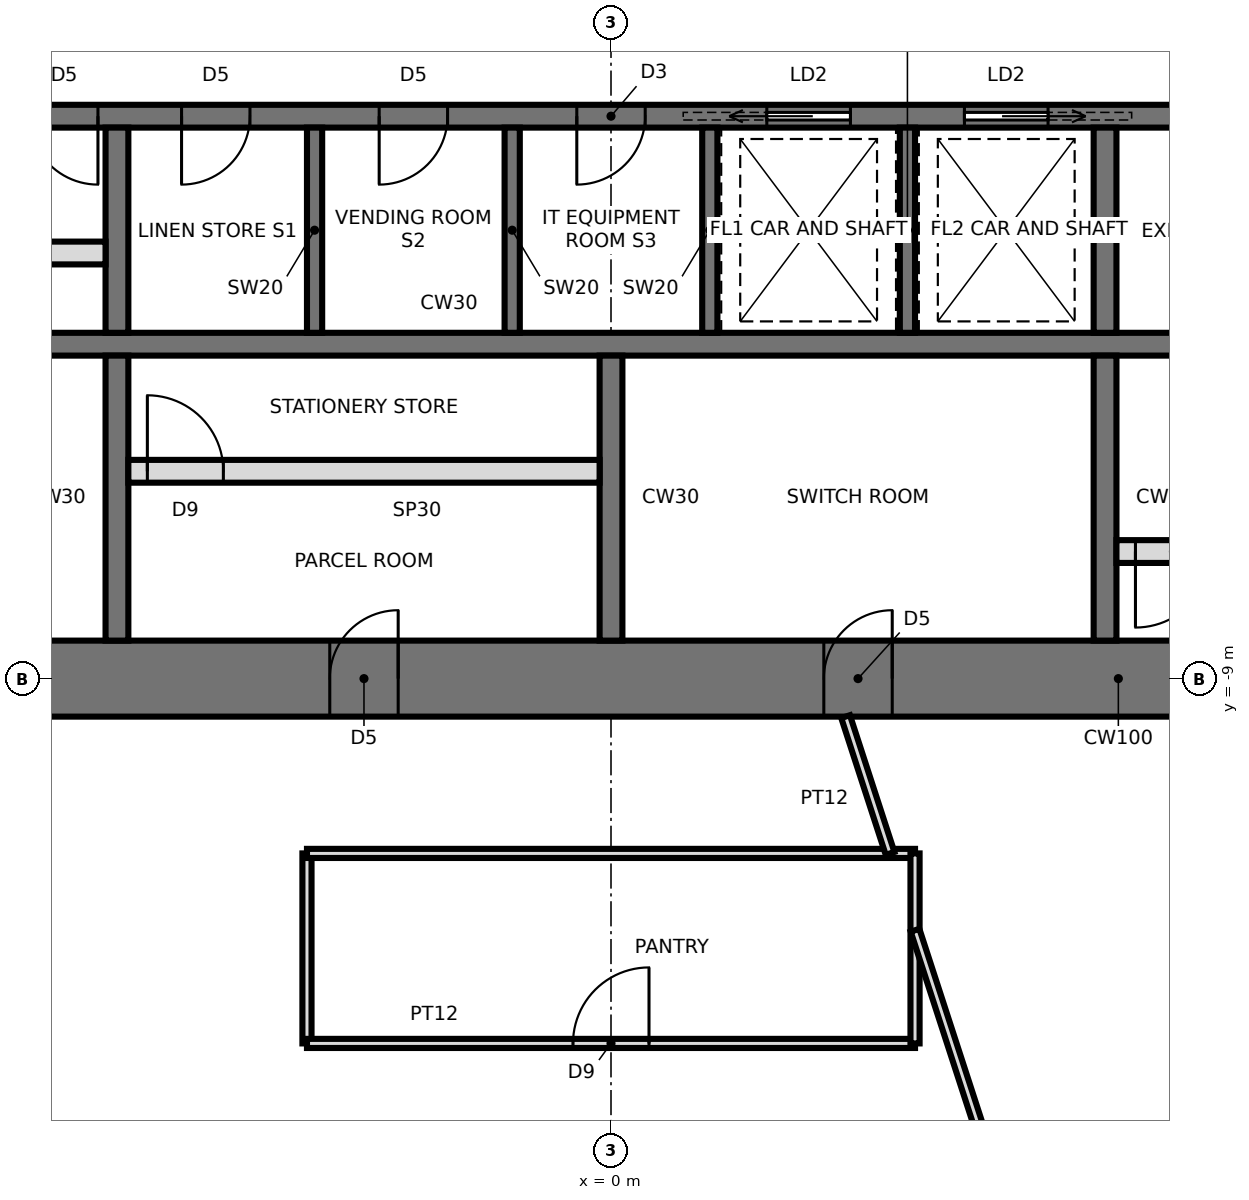
"""IFC4 building model, lengths in metres.
Left out: names, types, materials, properties, quantities, classifications, styles, units other than length and angle.
Written with IfcOpenShell. Run it as: python <this file> out.ifc"""

import sys

from ifc_helpers import new_model, si_unit, direction, frame, frame_2d, origin, place, context, subcontext, project, spatial, rectangle, extrude, element, fill, save


model = new_model("IFC4")
c1 = context("Model", 3, precision=1e-05, world=origin(), true_north=direction((0.0, 1.0)))
c2 = subcontext(c1, "Body", "Model", "MODEL_VIEW")
j1 = project(units=[si_unit("LENGTHUNIT", "METRE"), si_unit("PLANEANGLEUNIT", "RADIAN")], contexts=[c1])
p1 = place(None, origin())
s1 = spatial("IfcSite", under=j1, at=p1, CompositionType="ELEMENT")
p2 = place(p1, origin())
s2 = spatial("IfcBuilding", under=s1, at=p2, CompositionType="ELEMENT")
p3 = place(p2, frame((0.0, 0.0, 256.0)))
s3 = spatial("IfcBuildingStorey", under=s2, at=p3, CompositionType="ELEMENT", Elevation=256.0)
p4 = place(p3, frame((-13.2, -9.0, 0.0), z_axis=(0.0, 0.0, 1.0), x_axis=(1.0, 0.0, 0.0)))
e1 = element("IfcWall", 1, at=p4, inside=s3, PredefinedType="SHEAR", context=c2, shape_type="SweptSolid", body=[
    extrude(rectangle(XDim=26.4, YDim=1.0, at=frame_2d((13.2, 0.0))), origin(), (0.0, 0.0, 1.0), 4.2),
])
p5 = place(p4, frame((2.65, 0.0, 0.0)))
e2 = element("IfcOpeningElement", 2, at=p5, cuts=e1, PredefinedType="OPENING", context=c2, shape_type="SweptSolid", body=[
    extrude(rectangle(XDim=0.9, YDim=2.1, at=frame_2d((0.45, 1.05))), frame((0.0, 0.51, 0.0), z_axis=(0.0, -1.0, 0.0), x_axis=(1.0, 0.0, 0.0)), (0.0, 0.0, 1.0), 1.02),
])
p6 = place(p4, frame((9.5, 0.0, 0.0)))
e3 = element("IfcOpeningElement", 3, at=p6, cuts=e1, PredefinedType="OPENING", context=c2, shape_type="SweptSolid", body=[
    extrude(rectangle(XDim=0.9, YDim=2.1, at=frame_2d((0.45, 1.05))), frame((0.0, 0.51, 0.0), z_axis=(0.0, -1.0, 0.0), x_axis=(1.0, 0.0, 0.0)), (0.0, 0.0, 1.0), 1.02),
])
p7 = place(p4, frame((16.0, 0.0, 0.0)))
e4 = element("IfcOpeningElement", 4, at=p7, cuts=e1, PredefinedType="OPENING", context=c2, shape_type="SweptSolid", body=[
    extrude(rectangle(XDim=0.9, YDim=2.1, at=frame_2d((0.45, 1.05))), frame((0.0, 0.51, 0.0), z_axis=(0.0, -1.0, 0.0), x_axis=(1.0, 0.0, 0.0)), (0.0, 0.0, 1.0), 1.02),
])
p8 = place(p4, frame((22.85, 0.0, 0.0)))
e5 = element("IfcOpeningElement", 5, at=p8, cuts=e1, PredefinedType="OPENING", context=c2, shape_type="SweptSolid", body=[
    extrude(rectangle(XDim=0.9, YDim=2.1, at=frame_2d((0.45, 1.05))), frame((0.0, 0.51, 0.0), z_axis=(0.0, -1.0, 0.0), x_axis=(1.0, 0.0, 0.0)), (0.0, 0.0, 1.0), 1.02),
])
p9 = place(p3, frame((-13.2, -1.6, 0.0), z_axis=(0.0, 0.0, 1.0), x_axis=(1.0, 0.0, 0.0)))
e6 = element("IfcWall", 6, at=p9, inside=s3, PredefinedType="SHEAR", context=c2, shape_type="SweptSolid", body=[
    extrude(rectangle(XDim=26.4, YDim=0.3, at=frame_2d((13.2, 0.0))), origin(), (0.0, 0.0, 1.0), 4.2),
])
p10 = place(p9, frame((25.15, 0.0, 0.0)))
e7 = element("IfcOpeningElement", 7, at=p10, cuts=e6, PredefinedType="OPENING", context=c2, shape_type="SweptSolid", body=[
    extrude(rectangle(XDim=1.0, YDim=2.1, at=frame_2d((0.5, 1.05))), frame((0.0, 0.16, 0.0), z_axis=(0.0, -1.0, 0.0), x_axis=(1.0, 0.0, 0.0)), (0.0, 0.0, 1.0), 0.32),
])
p11 = place(p9, frame((7.55, 0.0, 0.0)))
e8 = element("IfcOpeningElement", 8, at=p11, cuts=e6, PredefinedType="OPENING", context=c2, shape_type="SweptSolid", body=[
    extrude(rectangle(XDim=0.9, YDim=2.1, at=frame_2d((0.45, 1.05))), frame((0.0, 0.16, 0.0), z_axis=(0.0, -1.0, 0.0), x_axis=(1.0, 0.0, 0.0)), (0.0, 0.0, 1.0), 0.32),
])
p12 = place(p9, frame((10.15, 0.0, 0.0)))
e9 = element("IfcOpeningElement", 9, at=p12, cuts=e6, PredefinedType="OPENING", context=c2, shape_type="SweptSolid", body=[
    extrude(rectangle(XDim=0.9, YDim=2.1, at=frame_2d((0.45, 1.05))), frame((0.0, 0.16, 0.0), z_axis=(0.0, -1.0, 0.0), x_axis=(1.0, 0.0, 0.0)), (0.0, 0.0, 1.0), 0.32),
])
p13 = place(p9, frame((12.75, 0.0, 0.0)))
e10 = element("IfcOpeningElement", 10, at=p13, cuts=e6, PredefinedType="OPENING", context=c2, shape_type="SweptSolid", body=[
    extrude(rectangle(XDim=0.9, YDim=2.1, at=frame_2d((0.45, 1.05))), frame((0.0, 0.16, 0.0), z_axis=(0.0, -1.0, 0.0), x_axis=(1.0, 0.0, 0.0)), (0.0, 0.0, 1.0), 0.32),
])
p14 = place(p9, frame((15.25, 0.0, 0.0)))
e11 = element("IfcOpeningElement", 11, at=p14, cuts=e6, PredefinedType="OPENING", context=c2, shape_type="SweptSolid", body=[
    extrude(rectangle(XDim=1.1, YDim=2.3, at=frame_2d((0.55, 1.15))), frame((0.0, 0.16, 0.0), z_axis=(0.0, -1.0, 0.0), x_axis=(1.0, 0.0, 0.0)), (0.0, 0.0, 1.0), 0.32),
])
p15 = place(p9, frame((17.85, 0.0, 0.0)))
e12 = element("IfcOpeningElement", 12, at=p15, cuts=e6, PredefinedType="OPENING", context=c2, shape_type="SweptSolid", body=[
    extrude(rectangle(XDim=1.1, YDim=2.3, at=frame_2d((0.55, 1.15))), frame((0.0, 0.16, 0.0), z_axis=(0.0, -1.0, 0.0), x_axis=(1.0, 0.0, 0.0)), (0.0, 0.0, 1.0), 0.32),
])
p16 = place(p9, frame((5.55, 0.0, 0.0)))
e13 = element("IfcOpeningElement", 13, at=p16, cuts=e6, PredefinedType="OPENING", context=c2, shape_type="SweptSolid", body=[
    extrude(rectangle(XDim=0.9, YDim=2.1, at=frame_2d((0.45, 1.05))), frame((0.0, 0.16, 0.0), z_axis=(0.0, -1.0, 0.0), x_axis=(1.0, 0.0, 0.0)), (0.0, 0.0, 1.0), 0.32),
])
p17 = place(p3, frame((-13.2, -4.6, 0.0), z_axis=(0.0, 0.0, 1.0), x_axis=(1.0, 0.0, 0.0)))
e14 = element("IfcWall", 14, at=p17, inside=s3, PredefinedType="SHEAR", context=c2, shape_type="SweptSolid", body=[
    extrude(rectangle(XDim=26.4, YDim=0.3, at=frame_2d((13.2, 0.0))), origin(), (0.0, 0.0, 1.0), 4.2),
])
p18 = place(p3, frame((-6.5, -1.75, 0.0), z_axis=(0.0, 0.0, 1.0), x_axis=(0.0, -1.0, 0.0)))
e15 = element("IfcWall", 15, at=p18, inside=s3, PredefinedType="SHEAR", context=c2, shape_type="SweptSolid", body=[
    extrude(rectangle(XDim=2.7, YDim=0.3, at=frame_2d((1.35, 0.0))), origin(), (0.0, 0.0, 1.0), 4.2),
])
p19 = place(p3, frame((-6.5, -4.75, 0.0), z_axis=(0.0, 0.0, 1.0), x_axis=(0.0, -1.0, 0.0)))
e16 = element("IfcWall", 16, at=p19, inside=s3, PredefinedType="SHEAR", context=c2, shape_type="SweptSolid", body=[
    extrude(rectangle(XDim=3.75, YDim=0.3, at=frame_2d((1.875, 0.0))), origin(), (0.0, 0.0, 1.0), 4.2),
])
p20 = place(p3, frame((6.5, -1.75, 0.0), z_axis=(0.0, 0.0, 1.0), x_axis=(0.0, -1.0, 0.0)))
e17 = element("IfcWall", 17, at=p20, inside=s3, PredefinedType="SHEAR", context=c2, shape_type="SweptSolid", body=[
    extrude(rectangle(XDim=2.7, YDim=0.3, at=frame_2d((1.35, 0.0))), origin(), (0.0, 0.0, 1.0), 4.2),
])
p21 = place(p3, frame((6.5, -4.75, 0.0), z_axis=(0.0, 0.0, 1.0), x_axis=(0.0, -1.0, 0.0)))
e18 = element("IfcWall", 18, at=p21, inside=s3, PredefinedType="SHEAR", context=c2, shape_type="SweptSolid", body=[
    extrude(rectangle(XDim=3.75, YDim=0.3, at=frame_2d((1.875, 0.0))), origin(), (0.0, 0.0, 1.0), 4.2),
])
for number, where, z_axis, x_axis in (
    (19, (-3.9, -1.75, 0.0), (0.0, 0.0, 1.0), (0.0, -1.0, 0.0)),
    (20, (-1.3, -1.75, 0.0), (0.0, 0.0, 1.0), (0.0, -1.0, 0.0)),
    (21, (1.3, -1.75, 0.0), (0.0, 0.0, 1.0), (0.0, -1.0, 0.0)),
    (22, (3.9, -1.75, 0.0), (0.0, 0.0, 1.0), (0.0, -1.0, 0.0)),
):
    element("IfcWall", number, at=place(p3, frame(where, z_axis=z_axis, x_axis=x_axis)), inside=s3, PredefinedType="SHEAR", context=c2, shape_type="SweptSolid", body=[
        extrude(rectangle(XDim=2.7, YDim=0.2, at=frame_2d((1.35, 0.0))), origin(), (0.0, 0.0, 1.0), 4.2),
    ])
p22 = place(p3, frame((0.0, -4.75, 0.0), z_axis=(0.0, 0.0, 1.0), x_axis=(0.0, -1.0, 0.0)))
e23 = element("IfcWall", 23, at=p22, inside=s3, PredefinedType="SHEAR", context=c2, shape_type="SweptSolid", body=[
    extrude(rectangle(XDim=3.75, YDim=0.3, at=frame_2d((1.875, 0.0))), origin(), (0.0, 0.0, 1.0), 4.2),
])
p23 = place(p3, frame((-6.35, -6.272, 0.0), z_axis=(0.0, 0.0, 1.0), x_axis=(1.0, 0.0, 0.0)))
e24 = element("IfcWall", 24, at=p23, inside=s3, PredefinedType="PARTITIONING", context=c2, shape_type="SweptSolid", body=[
    extrude(rectangle(XDim=6.2, YDim=0.3, at=frame_2d((3.1, 0.0))), origin(), (0.0, 0.0, 1.0), 4.04),
])
p24 = place(p23, frame((0.25, 0.0, 0.0)))
e25 = element("IfcOpeningElement", 25, at=p24, cuts=e24, PredefinedType="OPENING", context=c2, shape_type="SweptSolid", body=[
    extrude(rectangle(XDim=1.0, YDim=2.4, at=frame_2d((0.5, 1.2))), frame((0.0, 0.16, 0.0), z_axis=(0.0, -1.0, 0.0), x_axis=(1.0, 0.0, 0.0)), (0.0, 0.0, 1.0), 0.32),
])
p25 = place(p3, frame((6.65, -7.328, 0.0), z_axis=(0.0, 0.0, 1.0), x_axis=(1.0, 0.0, 0.0)))
e26 = element("IfcWall", 26, at=p25, inside=s3, PredefinedType="PARTITIONING", context=c2, shape_type="SweptSolid", body=[
    extrude(rectangle(XDim=6.55, YDim=0.3, at=frame_2d((3.275, 0.0))), origin(), (0.0, 0.0, 1.0), 4.04),
])
p26 = place(p25, frame((0.25, 0.0, 0.0)))
e27 = element("IfcOpeningElement", 27, at=p26, cuts=e26, PredefinedType="OPENING", context=c2, shape_type="SweptSolid", body=[
    extrude(rectangle(XDim=1.0, YDim=2.4, at=frame_2d((0.5, 1.2))), frame((0.0, 0.16, 0.0), z_axis=(0.0, -1.0, 0.0), x_axis=(1.0, 0.0, 0.0)), (0.0, 0.0, 1.0), 0.32),
])
p27 = place(p3, frame((-13.2, -3.4, 0.0), z_axis=(0.0, 0.0, 1.0), x_axis=(1.0, 0.0, 0.0)))
e28 = element("IfcWall", 28, at=p27, inside=s3, PredefinedType="SOLIDWALL", context=c2, shape_type="SweptSolid", body=[
    extrude(rectangle(XDim=6.55, YDim=0.3, at=frame_2d((3.275, 0.0))), origin(), (0.0, 0.0, 1.0), 4.04),
])
p28 = place(p27, frame((0.25, 0.0, 0.0)))
e29 = element("IfcOpeningElement", 29, at=p28, cuts=e28, PredefinedType="OPENING", context=c2, shape_type="SweptSolid", body=[
    extrude(rectangle(XDim=0.9, YDim=2.1, at=frame_2d((0.45, 1.05))), frame((0.0, 0.16, 0.0), z_axis=(0.0, -1.0, 0.0), x_axis=(1.0, 0.0, 0.0)), (0.0, 0.0, 1.0), 0.32),
])
p29 = place(p3, frame((-4.0, -11.3, 0.0), z_axis=(0.0, 0.0, 1.0), x_axis=(0.0, -1.0, 0.0)))
e30 = element("IfcWall", 30, at=p29, inside=s3, PredefinedType="PARTITIONING", context=c2, shape_type="SweptSolid", body=[
    extrude(rectangle(XDim=2.5, YDim=0.12, at=frame_2d((1.25, 0.0))), origin(), (0.0, 0.0, 1.0), 4.04),
])
p30 = place(p3, frame((-4.0, -13.8, 0.0), z_axis=(0.0, 0.0, 1.0), x_axis=(1.0, 0.0, 0.0)))
e31 = element("IfcWall", 31, at=p30, inside=s3, PredefinedType="PARTITIONING", context=c2, shape_type="SweptSolid", body=[
    extrude(rectangle(XDim=8.0, YDim=0.12, at=frame_2d((4.0, 0.0))), origin(), (0.0, 0.0, 1.0), 4.04),
])
p31 = place(p30, frame((3.5, 0.0, 0.0)))
e32 = element("IfcOpeningElement", 32, at=p31, cuts=e31, PredefinedType="OPENING", context=c2, shape_type="SweptSolid", body=[
    extrude(rectangle(XDim=1.0, YDim=2.4, at=frame_2d((0.5, 1.2))), frame((0.0, 0.07, 0.0), z_axis=(0.0, -1.0, 0.0), x_axis=(1.0, 0.0, 0.0)), (0.0, 0.0, 1.0), 0.14),
])
p32 = place(p3, frame((4.0, -11.3, 0.0), z_axis=(0.0, 0.0, 1.0), x_axis=(-1.0, 0.0, 0.0)))
e33 = element("IfcWall", 33, at=p32, inside=s3, PredefinedType="PARTITIONING", context=c2, shape_type="SweptSolid", body=[
    extrude(rectangle(XDim=8.0, YDim=0.12, at=frame_2d((4.0, 0.0))), origin(), (0.0, 0.0, 1.0), 4.04),
])
p33 = place(p3, frame((4.0, -13.8, 0.0), z_axis=(0.0, 0.0, 1.0), x_axis=(0.0, 1.0, 0.0)))
e34 = element("IfcWall", 34, at=p33, inside=s3, PredefinedType="PARTITIONING", context=c2, shape_type="SweptSolid", body=[
    extrude(rectangle(XDim=2.5, YDim=0.12, at=frame_2d((1.25, 0.0))), origin(), (0.0, 0.0, 1.0), 4.04),
])
p34 = place(p3, frame((6.137, -18.889, 0.0), z_axis=(0.0, 0.0, 1.0), x_axis=(-0.309007859613, 0.951059484311, 0.0)))
e35 = element("IfcWall", 35, at=p34, inside=s3, PredefinedType="PARTITIONING", context=c2, shape_type="SweptSolid", body=[
    extrude(rectangle(XDim=6.917, YDim=0.12, at=frame_2d((3.458, 0.0))), origin(), (0.0, 0.0, 1.0), 3.24),
])
p35 = place(p3, frame((3.672, -11.3, 0.0), z_axis=(0.0, 0.0, 1.0), x_axis=(-0.309059822154, 0.95104259964, 0.0)))
e36 = element("IfcWall", 36, at=p35, inside=s3, PredefinedType="PARTITIONING", context=c2, shape_type="SweptSolid", body=[
    extrude(rectangle(XDim=1.893, YDim=0.12, at=frame_2d((0.946, 0.0))), origin(), (0.0, 0.0, 1.0), 3.24),
])
p36 = place(p11, frame((0.9, 0.0, 0.0), z_axis=(0.0, 0.0, 1.0), x_axis=(-1.0, 0.0, 0.0)))
e37 = element("IfcDoor", 37, at=p36, inside=s3, OperationType="SINGLE_SWING_RIGHT", PredefinedType="DOOR", context=c2, shape_type="SweptSolid", body=[
    extrude(rectangle(XDim=0.9, YDim=2.1, at=frame_2d((0.45, 1.05))), frame((0.0, 0.025, 0.0), z_axis=(0.0, -1.0, 0.0), x_axis=(1.0, 0.0, 0.0)), (0.0, 0.0, 1.0), 0.05),
])
fill(e8, e37)
p37 = place(p12, frame((0.9, 0.0, 0.0), z_axis=(0.0, 0.0, 1.0), x_axis=(-1.0, 0.0, 0.0)))
e38 = element("IfcDoor", 38, at=p37, inside=s3, OperationType="SINGLE_SWING_RIGHT", PredefinedType="DOOR", context=c2, shape_type="SweptSolid", body=[
    extrude(rectangle(XDim=0.9, YDim=2.1, at=frame_2d((0.45, 1.05))), frame((0.0, 0.025, 0.0), z_axis=(0.0, -1.0, 0.0), x_axis=(1.0, 0.0, 0.0)), (0.0, 0.0, 1.0), 0.05),
])
fill(e9, e38)
p38 = place(p13, frame((0.9, 0.0, 0.0), z_axis=(0.0, 0.0, 1.0), x_axis=(-1.0, 0.0, 0.0)))
e39 = element("IfcDoor", 39, at=p38, inside=s3, OperationType="SINGLE_SWING_RIGHT", PredefinedType="DOOR", context=c2, shape_type="SweptSolid", body=[
    extrude(rectangle(XDim=0.9, YDim=2.1, at=frame_2d((0.45, 1.05))), frame((0.0, 0.025, 0.0), z_axis=(0.0, -1.0, 0.0), x_axis=(1.0, 0.0, 0.0)), (0.0, 0.0, 1.0), 0.05),
])
fill(e10, e39)
p39 = place(p14, frame((1.1, 0.0, 0.0), z_axis=(0.0, 0.0, 1.0), x_axis=(-1.0, 0.0, 0.0)))
e40 = element("IfcDoor", 40, at=p39, inside=s3, OperationType="SLIDING_TO_RIGHT", PredefinedType="DOOR", context=c2, shape_type="SweptSolid", body=[
    extrude(rectangle(XDim=1.1, YDim=2.3, at=frame_2d((0.55, 1.15))), frame((0.0, 0.025, 0.0), z_axis=(0.0, -1.0, 0.0), x_axis=(1.0, 0.0, 0.0)), (0.0, 0.0, 1.0), 0.05),
])
fill(e11, e40)
p40 = place(p15, frame((1.1, 0.0, 0.0), z_axis=(0.0, 0.0, 1.0), x_axis=(-1.0, 0.0, 0.0)))
e41 = element("IfcDoor", 41, at=p40, inside=s3, OperationType="SLIDING_TO_LEFT", PredefinedType="DOOR", context=c2, shape_type="SweptSolid", body=[
    extrude(rectangle(XDim=1.1, YDim=2.3, at=frame_2d((0.55, 1.15))), frame((0.0, 0.025, 0.0), z_axis=(0.0, -1.0, 0.0), x_axis=(1.0, 0.0, 0.0)), (0.0, 0.0, 1.0), 0.05),
])
fill(e12, e41)
p41 = place(p16, frame((0.9, 0.0, 0.0), z_axis=(0.0, 0.0, 1.0), x_axis=(-1.0, 0.0, 0.0)))
e42 = element("IfcDoor", 42, at=p41, inside=s3, OperationType="SINGLE_SWING_LEFT", PredefinedType="DOOR", context=c2, shape_type="SweptSolid", body=[
    extrude(rectangle(XDim=0.9, YDim=2.1, at=frame_2d((0.45, 1.05))), frame((0.0, 0.025, 0.0), z_axis=(0.0, -1.0, 0.0), x_axis=(1.0, 0.0, 0.0)), (0.0, 0.0, 1.0), 0.05),
])
fill(e13, e42)
p42 = place(p6, origin())
e43 = element("IfcDoor", 43, at=p42, inside=s3, OperationType="SINGLE_SWING_RIGHT", PredefinedType="DOOR", context=c2, shape_type="SweptSolid", body=[
    extrude(rectangle(XDim=0.82, YDim=2.06, at=frame_2d((0.45, 1.03))), frame((0.0, 0.025, 0.0), z_axis=(0.0, -1.0, 0.0), x_axis=(1.0, 0.0, 0.0)), (0.0, 0.0, 1.0), 0.05),
    extrude(rectangle(XDim=0.04, YDim=2.1, at=frame_2d((0.02, 1.05))), frame((0.0, 0.25, 0.0), z_axis=(0.0, -1.0, 0.0), x_axis=(1.0, 0.0, 0.0)), (0.0, 0.0, 1.0), 0.5),
    extrude(rectangle(XDim=0.04, YDim=2.1, at=frame_2d((0.88, 1.05))), frame((0.0, 0.25, 0.0), z_axis=(0.0, -1.0, 0.0), x_axis=(1.0, 0.0, 0.0)), (0.0, 0.0, 1.0), 0.5),
    extrude(rectangle(XDim=0.82, YDim=0.04, at=frame_2d((0.45, 2.08))), frame((0.0, 0.25, 0.0), z_axis=(0.0, -1.0, 0.0), x_axis=(1.0, 0.0, 0.0)), (0.0, 0.0, 1.0), 0.5),
])
fill(e3, e43)
p43 = place(p7, origin())
e44 = element("IfcDoor", 44, at=p43, inside=s3, OperationType="SINGLE_SWING_RIGHT", PredefinedType="DOOR", context=c2, shape_type="SweptSolid", body=[
    extrude(rectangle(XDim=0.82, YDim=2.06, at=frame_2d((0.45, 1.03))), frame((0.0, 0.025, 0.0), z_axis=(0.0, -1.0, 0.0), x_axis=(1.0, 0.0, 0.0)), (0.0, 0.0, 1.0), 0.05),
    extrude(rectangle(XDim=0.04, YDim=2.1, at=frame_2d((0.02, 1.05))), frame((0.0, 0.25, 0.0), z_axis=(0.0, -1.0, 0.0), x_axis=(1.0, 0.0, 0.0)), (0.0, 0.0, 1.0), 0.5),
    extrude(rectangle(XDim=0.04, YDim=2.1, at=frame_2d((0.88, 1.05))), frame((0.0, 0.25, 0.0), z_axis=(0.0, -1.0, 0.0), x_axis=(1.0, 0.0, 0.0)), (0.0, 0.0, 1.0), 0.5),
    extrude(rectangle(XDim=0.82, YDim=0.04, at=frame_2d((0.45, 2.08))), frame((0.0, 0.25, 0.0), z_axis=(0.0, -1.0, 0.0), x_axis=(1.0, 0.0, 0.0)), (0.0, 0.0, 1.0), 0.5),
])
fill(e4, e44)
p44 = place(p24, origin())
e45 = element("IfcDoor", 45, at=p44, inside=s3, OperationType="SINGLE_SWING_LEFT", PredefinedType="DOOR", context=c2, shape_type="SweptSolid", body=[
    extrude(rectangle(XDim=1.0, YDim=2.4, at=frame_2d((0.5, 1.2))), frame((0.0, 0.025, 0.0), z_axis=(0.0, -1.0, 0.0), x_axis=(1.0, 0.0, 0.0)), (0.0, 0.0, 1.0), 0.05),
])
fill(e25, e45)
p45 = place(p26, frame((1.0, 0.0, 0.0), z_axis=(0.0, 0.0, 1.0), x_axis=(-1.0, 0.0, 0.0)))
e46 = element("IfcDoor", 46, at=p45, inside=s3, OperationType="SINGLE_SWING_RIGHT", PredefinedType="DOOR", context=c2, shape_type="SweptSolid", body=[
    extrude(rectangle(XDim=1.0, YDim=2.4, at=frame_2d((0.5, 1.2))), frame((0.0, 0.025, 0.0), z_axis=(0.0, -1.0, 0.0), x_axis=(1.0, 0.0, 0.0)), (0.0, 0.0, 1.0), 0.05),
])
fill(e27, e46)
p46 = place(p31, origin())
e47 = element("IfcDoor", 47, at=p46, inside=s3, OperationType="SINGLE_SWING_RIGHT", PredefinedType="DOOR", context=c2, shape_type="SweptSolid", body=[
    extrude(rectangle(XDim=1.0, YDim=2.4, at=frame_2d((0.5, 1.2))), frame((0.0, 0.025, 0.0), z_axis=(0.0, -1.0, 0.0), x_axis=(1.0, 0.0, 0.0)), (0.0, 0.0, 1.0), 0.05),
])
fill(e32, e47)
save(model, sys.argv[1])
